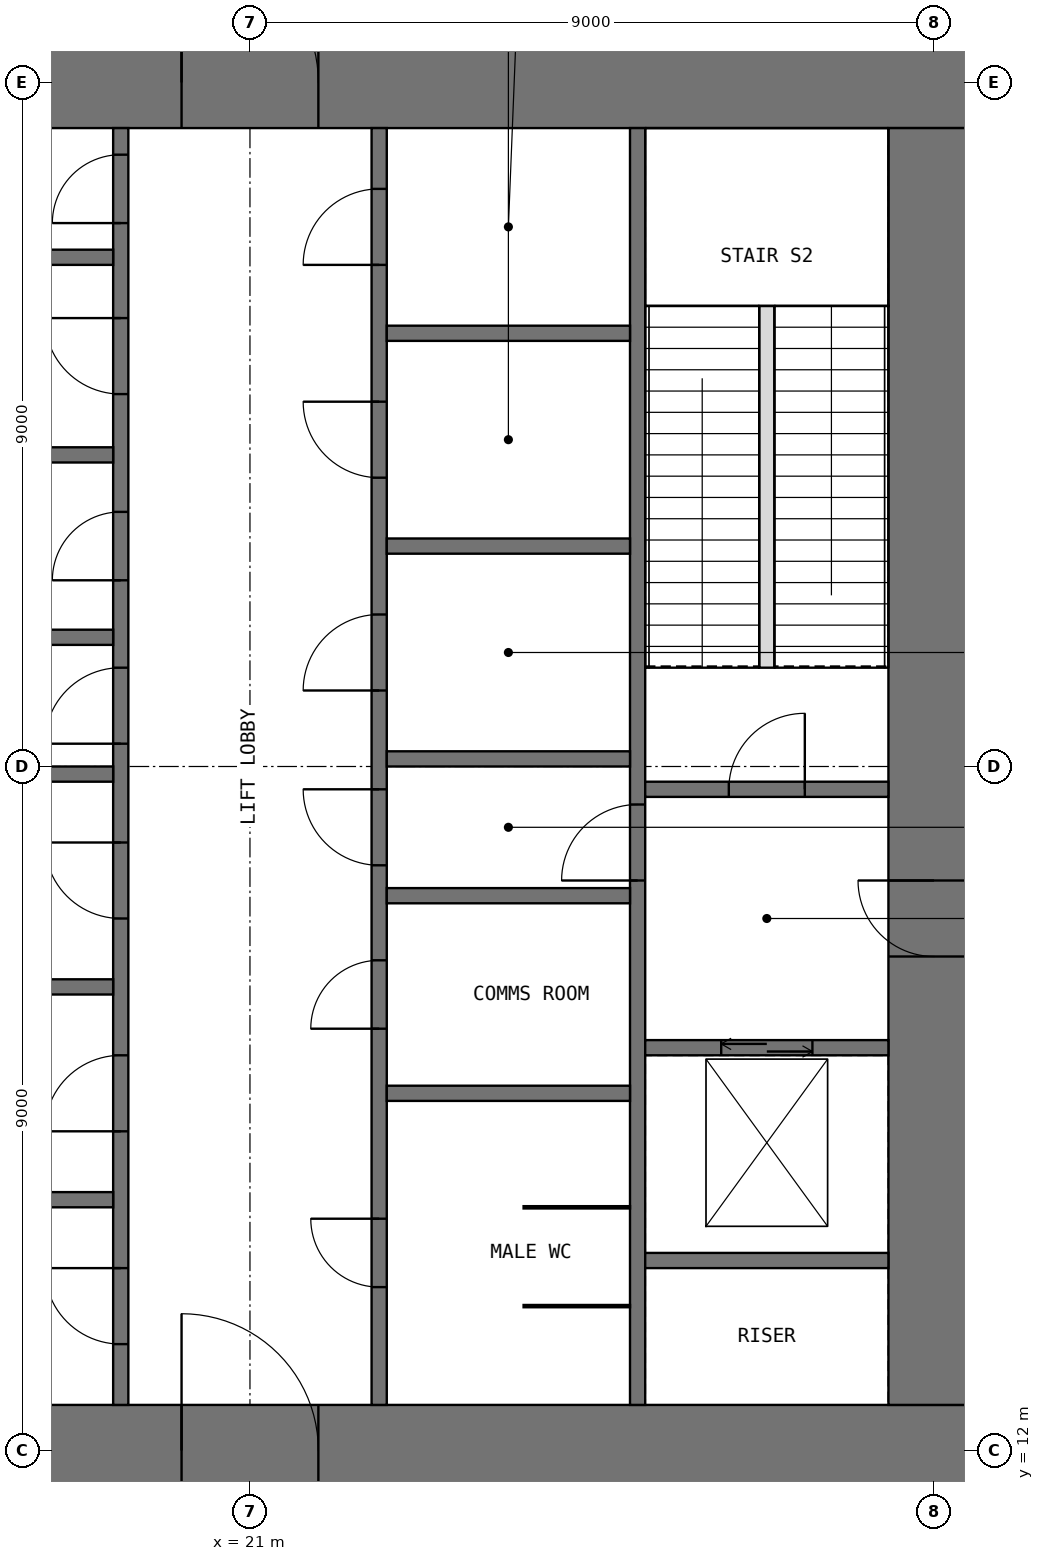
"""IFC4 building model, lengths in metres.
Left out: names, types, materials, properties, quantities, classifications, styles, units other than length and angle.
Written with IfcOpenShell. Run it as: python <this file> out.ifc"""

import sys

from ifc_helpers import new_model, si_unit, direction, frame, frame_2d, origin, place, context, subcontext, project, spatial, rectangle, extrude, element, fill, save


model = new_model("IFC4")
c1 = context("Model", 3, precision=1e-05, world=origin(), true_north=direction((0.0, 1.0)))
c2 = subcontext(c1, "Body", "Model", "MODEL_VIEW")
j1 = project(units=[si_unit("LENGTHUNIT", "METRE"), si_unit("PLANEANGLEUNIT", "RADIAN")], contexts=[c1])
p1 = place(None, origin())
s1 = spatial("IfcSite", under=j1, at=p1, CompositionType="ELEMENT")
p2 = place(p1, origin())
s2 = spatial("IfcBuilding", under=s1, at=p2, CompositionType="ELEMENT")
p3 = place(p2, frame((0.0, 0.0, 277.9)))
s3 = spatial("IfcBuildingStorey", under=s2, at=p3, CompositionType="ELEMENT", Elevation=277.9)
p4 = place(p3, frame((11.4, 12.0, -0.1), z_axis=(0.0, 0.0, 1.0), x_axis=(1.0, 0.0, 0.0)))
e1 = element("IfcWall", 1, at=p4, inside=s3, PredefinedType="SHEAR", context=c2, shape_type="SweptSolid", body=[
    extrude(rectangle(XDim=19.2, YDim=1.2, at=frame_2d((9.6, 0.0))), origin(), (0.0, 0.0, 1.0), 6.0),
])
p5 = place(p4, frame((8.7, 0.0, 0.1)))
e2 = element("IfcOpeningElement", 2, at=p5, cuts=e1, PredefinedType="OPENING", context=c2, shape_type="SweptSolid", body=[
    extrude(rectangle(XDim=1.8, YDim=2.4, at=frame_2d((0.9, 1.2))), frame((0.0, 0.61, 0.0), z_axis=(0.0, -1.0, 0.0), x_axis=(1.0, 0.0, 0.0)), (0.0, 0.0, 1.0), 1.22),
])
p6 = place(p3, frame((11.4, 30.0, -0.1), z_axis=(0.0, 0.0, 1.0), x_axis=(1.0, 0.0, 0.0)))
e3 = element("IfcWall", 3, at=p6, inside=s3, PredefinedType="SHEAR", context=c2, shape_type="SweptSolid", body=[
    extrude(rectangle(XDim=19.2, YDim=1.2, at=frame_2d((9.6, 0.0))), origin(), (0.0, 0.0, 1.0), 6.0),
])
p7 = place(p6, frame((8.7, 0.0, 0.1)))
e4 = element("IfcOpeningElement", 4, at=p7, cuts=e3, PredefinedType="OPENING", context=c2, shape_type="SweptSolid", body=[
    extrude(rectangle(XDim=1.8, YDim=2.4, at=frame_2d((0.9, 1.2))), frame((0.0, 0.61, 0.0), z_axis=(0.0, -1.0, 0.0), x_axis=(1.0, 0.0, 0.0)), (0.0, 0.0, 1.0), 1.22),
])
p8 = place(p3, frame((30.0, 12.6, -0.1), z_axis=(0.0, 0.0, 1.0), x_axis=(0.0, 1.0, 0.0)))
e5 = element("IfcWall", 5, at=p8, inside=s3, PredefinedType="SHEAR", context=c2, shape_type="SweptSolid", body=[
    extrude(rectangle(XDim=16.8, YDim=1.2, at=frame_2d((8.4, 0.0))), origin(), (0.0, 0.0, 1.0), 6.0),
])
p9 = place(p8, frame((5.9, 0.0, 0.1)))
e6 = element("IfcOpeningElement", 6, at=p9, cuts=e5, PredefinedType="OPENING", context=c2, shape_type="SweptSolid", body=[
    extrude(rectangle(XDim=1.0, YDim=2.2, at=frame_2d((0.5, 1.1))), frame((0.0, 0.61, 0.0), z_axis=(0.0, -1.0, 0.0), x_axis=(1.0, 0.0, 0.0)), (0.0, 0.0, 1.0), 1.22),
])
p10 = place(p3, frame((19.3, 12.6, -0.1), z_axis=(0.0, 0.0, 1.0), x_axis=(0.0, 1.0, 0.0)))
e7 = element("IfcWall", 7, at=p10, inside=s3, PredefinedType="SHEAR", context=c2, shape_type="SweptSolid", body=[
    extrude(rectangle(XDim=16.8, YDim=0.2, at=frame_2d((8.4, 0.0))), origin(), (0.0, 0.0, 1.0), 6.0),
])
p11 = place(p10, frame((8.7, 0.0, 0.1)))
e8 = element("IfcOpeningElement", 8, at=p11, cuts=e7, PredefinedType="OPENING", context=c2, shape_type="SweptSolid", body=[
    extrude(rectangle(XDim=1.0, YDim=2.2, at=frame_2d((0.5, 1.1))), frame((0.0, 0.11, 0.0), z_axis=(0.0, -1.0, 0.0), x_axis=(1.0, 0.0, 0.0)), (0.0, 0.0, 1.0), 0.22),
])
p12 = place(p10, frame((10.85, 0.0, 0.1)))
e9 = element("IfcOpeningElement", 9, at=p12, cuts=e7, PredefinedType="OPENING", context=c2, shape_type="SweptSolid", body=[
    extrude(rectangle(XDim=0.9, YDim=2.2, at=frame_2d((0.45, 1.1))), frame((0.0, 0.11, 0.0), z_axis=(0.0, -1.0, 0.0), x_axis=(1.0, 0.0, 0.0)), (0.0, 0.0, 1.0), 0.22),
])
p13 = place(p10, frame((13.3, 0.0, 0.1)))
e10 = element("IfcOpeningElement", 10, at=p13, cuts=e7, PredefinedType="OPENING", context=c2, shape_type="SweptSolid", body=[
    extrude(rectangle(XDim=1.0, YDim=2.2, at=frame_2d((0.5, 1.1))), frame((0.0, 0.11, 0.0), z_axis=(0.0, -1.0, 0.0), x_axis=(1.0, 0.0, 0.0)), (0.0, 0.0, 1.0), 0.22),
])
p14 = place(p10, frame((15.55, 0.0, 0.1)))
e11 = element("IfcOpeningElement", 11, at=p14, cuts=e7, PredefinedType="OPENING", context=c2, shape_type="SweptSolid", body=[
    extrude(rectangle(XDim=0.9, YDim=2.2, at=frame_2d((0.45, 1.1))), frame((0.0, 0.11, 0.0), z_axis=(0.0, -1.0, 0.0), x_axis=(1.0, 0.0, 0.0)), (0.0, 0.0, 1.0), 0.22),
])
p15 = place(p10, frame((0.8, 0.0, 0.1)))
e12 = element("IfcOpeningElement", 12, at=p15, cuts=e7, PredefinedType="OPENING", context=c2, shape_type="SweptSolid", body=[
    extrude(rectangle(XDim=1.0, YDim=2.2, at=frame_2d((0.5, 1.1))), frame((0.0, 0.11, 0.0), z_axis=(0.0, -1.0, 0.0), x_axis=(1.0, 0.0, 0.0)), (0.0, 0.0, 1.0), 0.22),
])
p16 = place(p10, frame((3.6, 0.0, 0.1)))
e13 = element("IfcOpeningElement", 13, at=p16, cuts=e7, PredefinedType="OPENING", context=c2, shape_type="SweptSolid", body=[
    extrude(rectangle(XDim=1.0, YDim=2.2, at=frame_2d((0.5, 1.1))), frame((0.0, 0.11, 0.0), z_axis=(0.0, -1.0, 0.0), x_axis=(1.0, 0.0, 0.0)), (0.0, 0.0, 1.0), 0.22),
])
p17 = place(p10, frame((6.4, 0.0, 0.1)))
e14 = element("IfcOpeningElement", 14, at=p17, cuts=e7, PredefinedType="OPENING", context=c2, shape_type="SweptSolid", body=[
    extrude(rectangle(XDim=1.0, YDim=2.2, at=frame_2d((0.5, 1.1))), frame((0.0, 0.11, 0.0), z_axis=(0.0, -1.0, 0.0), x_axis=(1.0, 0.0, 0.0)), (0.0, 0.0, 1.0), 0.22),
])
p18 = place(p3, frame((22.7, 12.6, -0.1), z_axis=(0.0, 0.0, 1.0), x_axis=(0.0, 1.0, 0.0)))
e15 = element("IfcWall", 15, at=p18, inside=s3, PredefinedType="SHEAR", context=c2, shape_type="SweptSolid", body=[
    extrude(rectangle(XDim=16.8, YDim=0.2, at=frame_2d((8.4, 0.0))), origin(), (0.0, 0.0, 1.0), 6.0),
])
p19 = place(p18, frame((7.1, 0.0, 0.1)))
e16 = element("IfcOpeningElement", 16, at=p19, cuts=e15, PredefinedType="OPENING", context=c2, shape_type="SweptSolid", body=[
    extrude(rectangle(XDim=1.0, YDim=2.2, at=frame_2d((0.5, 1.1))), frame((0.0, 0.11, 0.0), z_axis=(0.0, -1.0, 0.0), x_axis=(1.0, 0.0, 0.0)), (0.0, 0.0, 1.0), 0.22),
])
p20 = place(p18, frame((1.55, 0.0, 0.1)))
e17 = element("IfcOpeningElement", 17, at=p20, cuts=e15, PredefinedType="OPENING", context=c2, shape_type="SweptSolid", body=[
    extrude(rectangle(XDim=0.9, YDim=2.2, at=frame_2d((0.45, 1.1))), frame((0.0, 0.11, 0.0), z_axis=(0.0, -1.0, 0.0), x_axis=(1.0, 0.0, 0.0)), (0.0, 0.0, 1.0), 0.22),
])
p21 = place(p18, frame((4.95, 0.0, 0.1)))
e18 = element("IfcOpeningElement", 18, at=p21, cuts=e15, PredefinedType="OPENING", context=c2, shape_type="SweptSolid", body=[
    extrude(rectangle(XDim=0.9, YDim=2.2, at=frame_2d((0.45, 1.1))), frame((0.0, 0.11, 0.0), z_axis=(0.0, -1.0, 0.0), x_axis=(1.0, 0.0, 0.0)), (0.0, 0.0, 1.0), 0.22),
])
p22 = place(p18, frame((9.4, 0.0, 0.1)))
e19 = element("IfcOpeningElement", 19, at=p22, cuts=e15, PredefinedType="OPENING", context=c2, shape_type="SweptSolid", body=[
    extrude(rectangle(XDim=1.0, YDim=2.2, at=frame_2d((0.5, 1.1))), frame((0.0, 0.11, 0.0), z_axis=(0.0, -1.0, 0.0), x_axis=(1.0, 0.0, 0.0)), (0.0, 0.0, 1.0), 0.22),
])
p23 = place(p18, frame((12.2, 0.0, 0.1)))
e20 = element("IfcOpeningElement", 20, at=p23, cuts=e15, PredefinedType="OPENING", context=c2, shape_type="SweptSolid", body=[
    extrude(rectangle(XDim=1.0, YDim=2.2, at=frame_2d((0.5, 1.1))), frame((0.0, 0.11, 0.0), z_axis=(0.0, -1.0, 0.0), x_axis=(1.0, 0.0, 0.0)), (0.0, 0.0, 1.0), 0.22),
])
p24 = place(p18, frame((15.0, 0.0, 0.1)))
e21 = element("IfcOpeningElement", 21, at=p24, cuts=e15, PredefinedType="OPENING", context=c2, shape_type="SweptSolid", body=[
    extrude(rectangle(XDim=1.0, YDim=2.2, at=frame_2d((0.5, 1.1))), frame((0.0, 0.11, 0.0), z_axis=(0.0, -1.0, 0.0), x_axis=(1.0, 0.0, 0.0)), (0.0, 0.0, 1.0), 0.22),
])
p25 = place(p3, frame((26.1, 12.6, -0.1), z_axis=(0.0, 0.0, 1.0), x_axis=(0.0, 1.0, 0.0)))
e22 = element("IfcWall", 22, at=p25, inside=s3, PredefinedType="SHEAR", context=c2, shape_type="SweptSolid", body=[
    extrude(rectangle(XDim=16.8, YDim=0.2, at=frame_2d((8.4, 0.0))), origin(), (0.0, 0.0, 1.0), 6.0),
])
p26 = place(p25, frame((6.9, 0.0, 0.1)))
e23 = element("IfcOpeningElement", 23, at=p26, cuts=e22, PredefinedType="OPENING", context=c2, shape_type="SweptSolid", body=[
    extrude(rectangle(XDim=1.0, YDim=2.2, at=frame_2d((0.5, 1.1))), frame((0.0, 0.11, 0.0), z_axis=(0.0, -1.0, 0.0), x_axis=(1.0, 0.0, 0.0)), (0.0, 0.0, 1.0), 0.22),
])
for number, where, z_axis, x_axis in (
    (24, (16.0, 15.3, -0.1), (0.0, 0.0, 1.0), (1.0, 0.0, 0.0)),
    (25, (16.0, 18.1, -0.1), (0.0, 0.0, 1.0), (1.0, 0.0, 0.0)),
    (26, (16.0, 20.9, -0.1), (0.0, 0.0, 1.0), (1.0, 0.0, 0.0)),
    (27, (16.0, 22.7, -0.1), (0.0, 0.0, 1.0), (1.0, 0.0, 0.0)),
    (28, (16.0, 25.1, -0.1), (0.0, 0.0, 1.0), (1.0, 0.0, 0.0)),
    (29, (16.0, 27.7, -0.1), (0.0, 0.0, 1.0), (1.0, 0.0, 0.0)),
    (30, (22.8, 16.7, -0.1), (0.0, 0.0, 1.0), (1.0, 0.0, 0.0)),
    (31, (22.8, 19.3, -0.1), (0.0, 0.0, 1.0), (1.0, 0.0, 0.0)),
    (32, (22.8, 21.1, -0.1), (0.0, 0.0, 1.0), (1.0, 0.0, 0.0)),
    (33, (22.8, 23.9, -0.1), (0.0, 0.0, 1.0), (1.0, 0.0, 0.0)),
    (34, (22.8, 26.7, -0.1), (0.0, 0.0, 1.0), (1.0, 0.0, 0.0)),
    (35, (26.2, 14.5, -0.1), (0.0, 0.0, 1.0), (1.0, 0.0, 0.0)),
):
    element("IfcWall", number, at=place(p3, frame(where, z_axis=z_axis, x_axis=x_axis)), inside=s3, PredefinedType="SHEAR", context=c2, shape_type="SweptSolid", body=[
        extrude(rectangle(XDim=3.2, YDim=0.2, at=frame_2d((1.6, 0.0))), origin(), (0.0, 0.0, 1.0), 6.0),
    ])
p27 = place(p3, frame((26.2, 17.3, -0.1), z_axis=(0.0, 0.0, 1.0), x_axis=(1.0, 0.0, 0.0)))
e36 = element("IfcWall", 36, at=p27, inside=s3, PredefinedType="SHEAR", context=c2, shape_type="SweptSolid", body=[
    extrude(rectangle(XDim=3.2, YDim=0.2, at=frame_2d((1.6, 0.0))), origin(), (0.0, 0.0, 1.0), 6.0),
])
p28 = place(p27, frame((1.0, 0.0, 0.1)))
e37 = element("IfcOpeningElement", 37, at=p28, cuts=e36, PredefinedType="OPENING", context=c2, shape_type="SweptSolid", body=[
    extrude(rectangle(XDim=1.2, YDim=2.2, at=frame_2d((0.6, 1.1))), frame((0.0, 0.11, 0.0), z_axis=(0.0, -1.0, 0.0), x_axis=(1.0, 0.0, 0.0)), (0.0, 0.0, 1.0), 0.22),
])
p29 = place(p3, frame((26.2, 20.7, -0.1), z_axis=(0.0, 0.0, 1.0), x_axis=(1.0, 0.0, 0.0)))
e38 = element("IfcWall", 38, at=p29, inside=s3, PredefinedType="SHEAR", context=c2, shape_type="SweptSolid", body=[
    extrude(rectangle(XDim=3.2, YDim=0.2, at=frame_2d((1.6, 0.0))), origin(), (0.0, 0.0, 1.0), 6.0),
])
p30 = place(p29, frame((1.1, 0.0, 0.1)))
e39 = element("IfcOpeningElement", 39, at=p30, cuts=e38, PredefinedType="OPENING", context=c2, shape_type="SweptSolid", body=[
    extrude(rectangle(XDim=1.0, YDim=2.2, at=frame_2d((0.5, 1.1))), frame((0.0, 0.11, 0.0), z_axis=(0.0, -1.0, 0.0), x_axis=(1.0, 0.0, 0.0)), (0.0, 0.0, 1.0), 0.22),
])
for number, where, z_axis, x_axis in (
    (40, (24.6, 13.9, 0.0), (0.0, 0.0, 1.0), (1.0, 0.0, 0.0)),
    (41, (24.6, 15.2, 0.0), (0.0, 0.0, 1.0), (1.0, 0.0, 0.0)),
):
    element("IfcWall", number, at=place(p3, frame(where, z_axis=z_axis, x_axis=x_axis)), inside=s3, PredefinedType="PARTITIONING", context=c2, shape_type="SweptSolid", body=[
        extrude(rectangle(XDim=1.4, YDim=0.03, at=frame_2d((0.7, 0.0))), origin(), (0.0, 0.0, 1.0), 5.7),
    ])
p31 = place(p3, frame((27.8, 22.3, 0.0), z_axis=(0.0, 0.0, 1.0), x_axis=(0.0, 1.0, 0.0)))
e42 = element("IfcWall", 42, at=p31, inside=s3, PredefinedType="PARTITIONING", context=c2, shape_type="SweptSolid", body=[
    extrude(rectangle(XDim=4.76, YDim=0.2, at=frame_2d((2.38, 0.0))), origin(), (0.0, 0.0, 1.0), 6.0),
])
p32 = place(p5, origin())
e43 = element("IfcDoor", 43, at=p32, inside=s3, OperationType="DOUBLE_DOOR_SINGLE_SWING", PredefinedType="DOOR", context=c2, shape_type="SweptSolid", body=[
    extrude(rectangle(XDim=1.8, YDim=2.4, at=frame_2d((0.9, 1.2))), frame((0.0, -0.275, 0.0), z_axis=(0.0, -1.0, 0.0), x_axis=(1.0, 0.0, 0.0)), (0.0, 0.0, 1.0), 0.05),
])
fill(e2, e43)
p33 = place(p7, origin())
e44 = element("IfcDoor", 44, at=p33, inside=s3, OperationType="DOUBLE_DOOR_SINGLE_SWING", PredefinedType="DOOR", context=c2, shape_type="SweptSolid", body=[
    extrude(rectangle(XDim=1.8, YDim=2.4, at=frame_2d((0.9, 1.2))), frame((0.0, 0.325, 0.0), z_axis=(0.0, -1.0, 0.0), x_axis=(1.0, 0.0, 0.0)), (0.0, 0.0, 1.0), 0.05),
])
fill(e4, e44)
p34 = place(p9, origin())
e45 = element("IfcDoor", 45, at=p34, inside=s3, OperationType="SINGLE_SWING_RIGHT", PredefinedType="DOOR", context=c2, shape_type="SweptSolid", body=[
    extrude(rectangle(XDim=1.0, YDim=2.2, at=frame_2d((0.5, 1.1))), frame((0.0, -0.275, 0.0), z_axis=(0.0, -1.0, 0.0), x_axis=(1.0, 0.0, 0.0)), (0.0, 0.0, 1.0), 0.05),
])
fill(e6, e45)
p35 = place(p30, origin())
e46 = element("IfcDoor", 46, at=p35, inside=s3, OperationType="SINGLE_SWING_RIGHT", PredefinedType="DOOR", context=c2, shape_type="SweptSolid", body=[
    extrude(rectangle(XDim=1.0, YDim=2.2, at=frame_2d((0.5, 1.1))), frame((0.0, 0.025, 0.0), z_axis=(0.0, -1.0, 0.0), x_axis=(1.0, 0.0, 0.0)), (0.0, 0.0, 1.0), 0.05),
])
fill(e39, e46)
p36 = place(p26, origin())
e47 = element("IfcDoor", 47, at=p36, inside=s3, OperationType="SINGLE_SWING_LEFT", PredefinedType="DOOR", context=c2, shape_type="SweptSolid", body=[
    extrude(rectangle(XDim=1.0, YDim=2.2, at=frame_2d((0.5, 1.1))), frame((0.0, 0.025, 0.0), z_axis=(0.0, -1.0, 0.0), x_axis=(1.0, 0.0, 0.0)), (0.0, 0.0, 1.0), 0.05),
])
fill(e23, e47)
p37 = place(p11, origin())
e48 = element("IfcDoor", 48, at=p37, inside=s3, OperationType="SINGLE_SWING_LEFT", PredefinedType="DOOR", context=c2, shape_type="SweptSolid", body=[
    extrude(rectangle(XDim=1.0, YDim=2.2, at=frame_2d((0.5, 1.1))), frame((0.0, 0.025, 0.0), z_axis=(0.0, -1.0, 0.0), x_axis=(1.0, 0.0, 0.0)), (0.0, 0.0, 1.0), 0.05),
])
fill(e8, e48)
p38 = place(p19, origin())
e49 = element("IfcDoor", 49, at=p38, inside=s3, OperationType="SINGLE_SWING_RIGHT", PredefinedType="DOOR", context=c2, shape_type="SweptSolid", body=[
    extrude(rectangle(XDim=1.0, YDim=2.2, at=frame_2d((0.5, 1.1))), frame((0.0, 0.025, 0.0), z_axis=(0.0, -1.0, 0.0), x_axis=(1.0, 0.0, 0.0)), (0.0, 0.0, 1.0), 0.05),
])
fill(e16, e49)
p39 = place(p12, origin())
e50 = element("IfcDoor", 50, at=p39, inside=s3, OperationType="SINGLE_SWING_LEFT", PredefinedType="DOOR", context=c2, shape_type="SweptSolid", body=[
    extrude(rectangle(XDim=0.9, YDim=2.2, at=frame_2d((0.45, 1.1))), frame((0.0, 0.025, 0.0), z_axis=(0.0, -1.0, 0.0), x_axis=(1.0, 0.0, 0.0)), (0.0, 0.0, 1.0), 0.05),
])
fill(e9, e50)
p40 = place(p13, origin())
e51 = element("IfcDoor", 51, at=p40, inside=s3, OperationType="SINGLE_SWING_RIGHT", PredefinedType="DOOR", context=c2, shape_type="SweptSolid", body=[
    extrude(rectangle(XDim=1.0, YDim=2.2, at=frame_2d((0.5, 1.1))), frame((0.0, 0.025, 0.0), z_axis=(0.0, -1.0, 0.0), x_axis=(1.0, 0.0, 0.0)), (0.0, 0.0, 1.0), 0.05),
])
fill(e10, e51)
p41 = place(p14, origin())
e52 = element("IfcDoor", 52, at=p41, inside=s3, OperationType="SINGLE_SWING_LEFT", PredefinedType="DOOR", context=c2, shape_type="SweptSolid", body=[
    extrude(rectangle(XDim=0.9, YDim=2.2, at=frame_2d((0.45, 1.1))), frame((0.0, 0.025, 0.0), z_axis=(0.0, -1.0, 0.0), x_axis=(1.0, 0.0, 0.0)), (0.0, 0.0, 1.0), 0.05),
])
fill(e11, e52)
p42 = place(p20, origin())
e53 = element("IfcDoor", 53, at=p42, inside=s3, OperationType="SINGLE_SWING_RIGHT", PredefinedType="DOOR", context=c2, shape_type="SweptSolid", body=[
    extrude(rectangle(XDim=0.9, YDim=2.2, at=frame_2d((0.45, 1.1))), frame((0.0, 0.025, 0.0), z_axis=(0.0, -1.0, 0.0), x_axis=(1.0, 0.0, 0.0)), (0.0, 0.0, 1.0), 0.05),
])
fill(e17, e53)
p43 = place(p21, origin())
e54 = element("IfcDoor", 54, at=p43, inside=s3, OperationType="SINGLE_SWING_LEFT", PredefinedType="DOOR", context=c2, shape_type="SweptSolid", body=[
    extrude(rectangle(XDim=0.9, YDim=2.2, at=frame_2d((0.45, 1.1))), frame((0.0, 0.025, 0.0), z_axis=(0.0, -1.0, 0.0), x_axis=(1.0, 0.0, 0.0)), (0.0, 0.0, 1.0), 0.05),
])
fill(e18, e54)
p44 = place(p15, origin())
e55 = element("IfcDoor", 55, at=p44, inside=s3, OperationType="SINGLE_SWING_RIGHT", PredefinedType="DOOR", context=c2, shape_type="SweptSolid", body=[
    extrude(rectangle(XDim=1.0, YDim=2.2, at=frame_2d((0.5, 1.1))), frame((0.0, 0.025, 0.0), z_axis=(0.0, -1.0, 0.0), x_axis=(1.0, 0.0, 0.0)), (0.0, 0.0, 1.0), 0.05),
])
fill(e12, e55)
p45 = place(p16, origin())
e56 = element("IfcDoor", 56, at=p45, inside=s3, OperationType="SINGLE_SWING_LEFT", PredefinedType="DOOR", context=c2, shape_type="SweptSolid", body=[
    extrude(rectangle(XDim=1.0, YDim=2.2, at=frame_2d((0.5, 1.1))), frame((0.0, 0.025, 0.0), z_axis=(0.0, -1.0, 0.0), x_axis=(1.0, 0.0, 0.0)), (0.0, 0.0, 1.0), 0.05),
])
fill(e13, e56)
p46 = place(p17, origin())
e57 = element("IfcDoor", 57, at=p46, inside=s3, OperationType="SINGLE_SWING_RIGHT", PredefinedType="DOOR", context=c2, shape_type="SweptSolid", body=[
    extrude(rectangle(XDim=1.0, YDim=2.2, at=frame_2d((0.5, 1.1))), frame((0.0, 0.025, 0.0), z_axis=(0.0, -1.0, 0.0), x_axis=(1.0, 0.0, 0.0)), (0.0, 0.0, 1.0), 0.05),
])
fill(e14, e57)
p47 = place(p22, origin())
e58 = element("IfcDoor", 58, at=p47, inside=s3, OperationType="SINGLE_SWING_LEFT", PredefinedType="DOOR", context=c2, shape_type="SweptSolid", body=[
    extrude(rectangle(XDim=1.0, YDim=2.2, at=frame_2d((0.5, 1.1))), frame((0.0, 0.025, 0.0), z_axis=(0.0, -1.0, 0.0), x_axis=(1.0, 0.0, 0.0)), (0.0, 0.0, 1.0), 0.05),
])
fill(e19, e58)
p48 = place(p23, origin())
e59 = element("IfcDoor", 59, at=p48, inside=s3, OperationType="SINGLE_SWING_RIGHT", PredefinedType="DOOR", context=c2, shape_type="SweptSolid", body=[
    extrude(rectangle(XDim=1.0, YDim=2.2, at=frame_2d((0.5, 1.1))), frame((0.0, 0.025, 0.0), z_axis=(0.0, -1.0, 0.0), x_axis=(1.0, 0.0, 0.0)), (0.0, 0.0, 1.0), 0.05),
])
fill(e20, e59)
p49 = place(p24, origin())
e60 = element("IfcDoor", 60, at=p49, inside=s3, OperationType="SINGLE_SWING_LEFT", PredefinedType="DOOR", context=c2, shape_type="SweptSolid", body=[
    extrude(rectangle(XDim=1.0, YDim=2.2, at=frame_2d((0.5, 1.1))), frame((0.0, 0.025, 0.0), z_axis=(0.0, -1.0, 0.0), x_axis=(1.0, 0.0, 0.0)), (0.0, 0.0, 1.0), 0.05),
])
fill(e21, e60)
p50 = place(p28, origin())
e61 = element("IfcDoor", 61, at=p50, inside=s3, OperationType="DOUBLE_DOOR_SLIDING", PredefinedType="DOOR", context=c2, shape_type="SweptSolid", body=[
    extrude(rectangle(XDim=1.2, YDim=2.2, at=frame_2d((0.6, 1.1))), frame((0.0, 0.025, 0.0), z_axis=(0.0, -1.0, 0.0), x_axis=(1.0, 0.0, 0.0)), (0.0, 0.0, 1.0), 0.05),
])
fill(e37, e61)
save(model, sys.argv[1])
